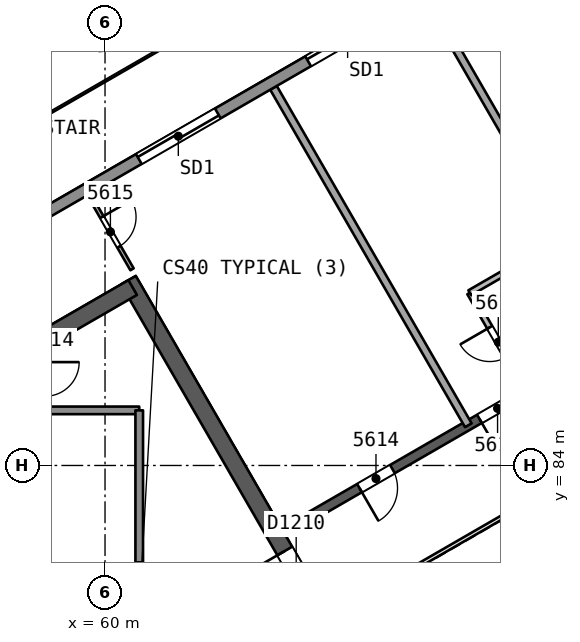
"""IFC4 building model, lengths in metres.
Left out: names, types, materials, properties, quantities, classifications, styles, units other than length and angle.
Written with IfcOpenShell. Run it as: python <this file> out.ifc"""

import sys

from ifc_helpers import new_model, si_unit, direction, frame, frame_2d, origin, place, context, subcontext, project, spatial, rectangle, extrude, element, fill, save


model = new_model("IFC4")
c1 = context("Model", 3, precision=1e-05, world=origin(), true_north=direction((0.0, 1.0)))
c2 = subcontext(c1, "Body", "Model", "MODEL_VIEW")
j1 = project(units=[si_unit("LENGTHUNIT", "METRE"), si_unit("PLANEANGLEUNIT", "RADIAN")], contexts=[c1])
p1 = place(None, origin())
s1 = spatial("IfcSite", under=j1, at=p1, CompositionType="ELEMENT")
p2 = place(p1, origin())
s2 = spatial("IfcBuilding", under=s1, at=p2, CompositionType="ELEMENT")
p3 = place(p2, frame((0.0, 0.0, 228.0)))
s3 = spatial("IfcBuildingStorey", under=s2, at=p3, CompositionType="ELEMENT", Elevation=228.0)
p4 = place(p3, frame((65.74, 80.0, 0.0), z_axis=(0.0, 0.0, 1.0), x_axis=(-0.499991857942, 0.866030104553, 0.0)))
e1 = element("IfcWall", 1, at=p4, inside=s3, PredefinedType="SHEAR", context=c2, shape_type="SweptSolid", body=[
    extrude(rectangle(XDim=10.25, YDim=0.45, at=frame_2d((5.125, 0.0))), origin(), (0.0, 0.0, 1.0), 3.7),
])
p5 = place(p4, frame((0.82, 0.0, 0.0)))
e2 = element("IfcOpeningElement", 2, at=p5, cuts=e1, PredefinedType="OPENING", context=c2, shape_type="SweptSolid", body=[
    extrude(rectangle(XDim=1.2, YDim=2.1, at=frame_2d((0.6, 1.05))), frame((0.0, 0.235, 0.0), z_axis=(0.0, -1.0, 0.0), x_axis=(1.0, 0.0, 0.0)), (0.0, 0.0, 1.0), 0.471),
])
p6 = place(p3, frame((60.728, 88.682, 0.0), z_axis=(0.0, 0.0, 1.0), x_axis=(-0.866021613849, -0.500006564303, 0.0)))
e3 = element("IfcWall", 3, at=p6, inside=s3, PredefinedType="SHEAR", context=c2, shape_type="SweptSolid", body=[
    extrude(rectangle(XDim=14.108, YDim=0.45, at=frame_2d((7.054, 0.0))), origin(), (0.0, 0.0, 1.0), 3.7),
])
p7 = place(p3, frame((78.2, 90.046, 0.0), z_axis=(0.0, 0.0, 1.0), x_axis=(-0.866026492143, -0.499998114903, 0.0)))
e4 = element("IfcWall", 4, at=p7, inside=s3, PredefinedType="SHEAR", context=c2, shape_type="SweptSolid", body=[
    extrude(rectangle(XDim=15.588, YDim=0.25, at=frame_2d((7.794, 0.0))), origin(), (0.0, 0.0, 1.0), 3.3),
])
p8 = place(p7, frame((2.15, 0.0, 0.0)))
e5 = element("IfcOpeningElement", 5, at=p8, cuts=e4, PredefinedType="OPENING", context=c2, shape_type="SweptSolid", body=[
    extrude(rectangle(XDim=1.0, YDim=2.1, at=frame_2d((0.5, 1.05))), frame((0.0, 0.135, 0.0), z_axis=(0.0, -1.0, 0.0), x_axis=(1.0, 0.0, 0.0)), (0.0, 0.0, 1.0), 0.271),
])
p9 = place(p7, frame((8.538, 0.0, 0.0)))
e6 = element("IfcOpeningElement", 6, at=p9, cuts=e4, PredefinedType="OPENING", context=c2, shape_type="SweptSolid", body=[
    extrude(rectangle(XDim=1.1, YDim=2.1, at=frame_2d((0.55, 1.05))), frame((0.0, 0.135, 0.0), z_axis=(0.0, -1.0, 0.0), x_axis=(1.0, 0.0, 0.0)), (0.0, 0.0, 1.0), 0.271),
])
p10 = place(p7, frame((12.282, 0.0, 0.0)))
e7 = element("IfcOpeningElement", 7, at=p10, cuts=e4, PredefinedType="OPENING", context=c2, shape_type="SweptSolid", body=[
    extrude(rectangle(XDim=1.0, YDim=2.1, at=frame_2d((0.5, 1.05))), frame((0.0, 0.135, 0.0), z_axis=(0.0, -1.0, 0.0), x_axis=(1.0, 0.0, 0.0)), (0.0, 0.0, 1.0), 0.271),
])
p11 = place(p3, frame((68.483, 96.276, 0.0), z_axis=(0.0, 0.0, 1.0), x_axis=(0.500011000363, -0.866019052629, 0.0)))
e8 = element("IfcWall", 8, at=p11, inside=s3, PredefinedType="PARTITIONING", context=c2, shape_type="SweptSolid", body=[
    extrude(rectangle(XDim=10.254, YDim=0.2, at=frame_2d((5.127, 0.0))), origin(), (0.0, 0.0, 1.0), 3.3),
])
p12 = place(p3, frame((71.099, 85.946, 0.0), z_axis=(0.0, 0.0, 1.0), x_axis=(-0.499990139034, 0.866031096941, 0.0)))
e9 = element("IfcWall", 9, at=p12, inside=s3, PredefinedType="PARTITIONING", context=c2, shape_type="SweptSolid", body=[
    extrude(rectangle(XDim=3.0, YDim=0.15, at=frame_2d((1.5, 0.0))), origin(), (0.0, 0.0, 1.0), 3.3),
])
p13 = place(p12, frame((1.05, 0.0, 0.0)))
e10 = element("IfcOpeningElement", 10, at=p13, cuts=e9, PredefinedType="OPENING", context=c2, shape_type="SweptSolid", body=[
    extrude(rectangle(XDim=0.9, YDim=2.1, at=frame_2d((0.45, 1.05))), frame((0.0, 0.085, 0.0), z_axis=(0.0, -1.0, 0.0), x_axis=(1.0, 0.0, 0.0)), (0.0, 0.0, 1.0), 0.171),
])
p14 = place(p3, frame((69.599, 88.544, 0.0), z_axis=(0.0, 0.0, 1.0), x_axis=(0.866032775405, 0.499987231761, 0.0)))
e11 = element("IfcWall", 11, at=p14, inside=s3, PredefinedType="PARTITIONING", context=c2, shape_type="SweptSolid", body=[
    extrude(rectangle(XDim=2.9, YDim=0.15, at=frame_2d((1.45, 0.0))), origin(), (0.0, 0.0, 1.0), 3.3),
])
p15 = place(p3, frame((64.433, 93.938, 0.0), z_axis=(0.0, 0.0, 1.0), x_axis=(0.500011000363, -0.866019052629, 0.0)))
e12 = element("IfcWall", 12, at=p15, inside=s3, PredefinedType="PARTITIONING", context=c2, shape_type="SweptSolid", body=[
    extrude(rectangle(XDim=10.254, YDim=0.2, at=frame_2d((5.127, 0.0))), origin(), (0.0, 0.0, 1.0), 3.3),
])
p16 = place(p3, frame((59.573, 91.132, 0.0), z_axis=(0.0, 0.0, 1.0), x_axis=(0.499948534732, -0.866055115232, 0.0)))
e13 = element("IfcWall", 13, at=p16, inside=s3, PredefinedType="PARTITIONING", context=c2, shape_type="SweptSolid", body=[
    extrude(rectangle(XDim=2.275, YDim=0.1, at=frame_2d((1.137, 0.0))), origin(), (0.0, 0.0, 1.0), 3.3),
])
p17 = place(p16, frame((0.687, 0.0, 0.0)))
e14 = element("IfcOpeningElement", 14, at=p17, cuts=e13, PredefinedType="OPENING", context=c2, shape_type="SweptSolid", body=[
    extrude(rectangle(XDim=0.9, YDim=2.1, at=frame_2d((0.45, 1.05))), frame((0.0, 0.061, 0.0), z_axis=(0.0, -1.0, 0.0), x_axis=(1.0, 0.0, 0.0)), (0.0, 0.0, 1.0), 0.121),
])
p18 = place(p3, frame((44.454, 82.574, 0.0), z_axis=(0.0, 0.0, 1.0), x_axis=(0.86602387423, 0.500002649256, 0.0)))
e15 = element("IfcWall", 15, at=p18, inside=s3, PredefinedType="SOLIDWALL", context=c2, shape_type="SweptSolid", body=[
    extrude(rectangle(XDim=50.333, YDim=0.3, at=frame_2d((25.167, 0.0))), origin(), (0.0, 0.0, 1.0), 3.3),
])
p19 = place(p18, frame((24.122, 0.0, 0.0)))
e16 = element("IfcOpeningElement", 16, at=p19, cuts=e15, PredefinedType="OPENING", context=c2, shape_type="SweptSolid", body=[
    extrude(rectangle(XDim=2.4, YDim=2.4, at=frame_2d((1.2, 1.2))), frame((0.0, 0.161, 0.0), z_axis=(0.0, -1.0, 0.0), x_axis=(1.0, 0.0, 0.0)), (0.0, 0.0, 1.0), 0.321),
])
p20 = place(p18, frame((29.111, 0.0, 0.0)))
e17 = element("IfcOpeningElement", 17, at=p20, cuts=e15, PredefinedType="OPENING", context=c2, shape_type="SweptSolid", body=[
    extrude(rectangle(XDim=2.4, YDim=2.4, at=frame_2d((1.2, 1.2))), frame((0.0, 0.161, 0.0), z_axis=(0.0, -1.0, 0.0), x_axis=(1.0, 0.0, 0.0)), (0.0, 0.0, 1.0), 0.321),
])
p21 = place(p18, frame((39.164, 0.0, 0.0)))
e18 = element("IfcOpeningElement", 18, at=p21, cuts=e15, PredefinedType="OPENING", context=c2, shape_type="SweptSolid", body=[
    extrude(rectangle(XDim=2.4, YDim=2.4, at=frame_2d((1.2, 1.2))), frame((0.0, 0.161, 0.0), z_axis=(0.0, -1.0, 0.0), x_axis=(1.0, 0.0, 0.0)), (0.0, 0.0, 1.0), 0.321),
])
p22 = place(p18, frame((18.978, 0.0, 0.0)))
e19 = element("IfcOpeningElement", 19, at=p22, cuts=e15, PredefinedType="OPENING", context=c2, shape_type="SweptSolid", body=[
    extrude(rectangle(XDim=2.4, YDim=2.4, at=frame_2d((1.2, 1.2))), frame((0.0, 0.161, 0.0), z_axis=(0.0, -1.0, 0.0), x_axis=(1.0, 0.0, 0.0)), (0.0, 0.0, 1.0), 0.321),
])
p23 = place(p18, frame((8.763, 0.0, 0.0)))
e20 = element("IfcOpeningElement", 20, at=p23, cuts=e15, PredefinedType="OPENING", context=c2, shape_type="SweptSolid", body=[
    extrude(rectangle(XDim=2.4, YDim=2.4, at=frame_2d((1.2, 1.2))), frame((0.0, 0.161, 0.0), z_axis=(0.0, -1.0, 0.0), x_axis=(1.0, 0.0, 0.0)), (0.0, 0.0, 1.0), 0.321),
])
p24 = place(p3, frame((60.9, 85.45, 0.0), z_axis=(0.0, 0.0, 1.0), x_axis=(-1.0, 0.0, 0.0)))
e21 = element("IfcWall", 21, at=p24, inside=s3, PredefinedType="SOLIDWALL", context=c2, shape_type="SweptSolid", body=[
    extrude(rectangle(XDim=2.48, YDim=0.2, at=frame_2d((1.24, 0.0))), origin(), (0.0, 0.0, 1.0), 3.3),
])
p25 = place(p3, frame((60.9, 85.45, 0.0), z_axis=(0.0, 0.0, 1.0), x_axis=(0.0, -1.0, 0.0)))
e22 = element("IfcWall", 22, at=p25, inside=s3, PredefinedType="SOLIDWALL", context=c2, shape_type="SweptSolid", body=[
    extrude(rectangle(XDim=10.9, YDim=0.2, at=frame_2d((5.45, 0.0))), origin(), (0.0, 0.0, 1.0), 3.3),
])
p26 = place(p25, frame((4.0, 0.0, 0.0)))
e23 = element("IfcOpeningElement", 23, at=p26, cuts=e22, PredefinedType="OPENING", context=c2, shape_type="SweptSolid", body=[
    extrude(rectangle(XDim=1.0, YDim=2.1, at=frame_2d((0.5, 1.05))), frame((0.0, 0.11, 0.0), z_axis=(0.0, -1.0, 0.0), x_axis=(1.0, 0.0, 0.0)), (0.0, 0.0, 1.0), 0.221),
])
p27 = place(p3, frame((77.738, 86.846, 0.0), z_axis=(0.0, 0.0, 1.0), x_axis=(-0.866026658274, -0.499997827154, 0.0)))
e24 = element("IfcWall", 24, at=p27, inside=s3, PredefinedType="PARTITIONING", context=c2, shape_type="SweptSolid", body=[
    extrude(rectangle(XDim=11.588, YDim=0.1, at=frame_2d((5.794, 0.0))), origin(), (0.0, 0.0, 1.0), 3.3),
])
p28 = place(p13, origin())
e25 = element("IfcDoor", 25, at=p28, inside=s3, OperationType="SINGLE_SWING_RIGHT", PredefinedType="NOTDEFINED", context=c2, shape_type="SweptSolid", body=[
    extrude(rectangle(XDim=0.9, YDim=2.1, at=frame_2d((0.45, 1.05))), frame((0.0, 0.025, 0.0), z_axis=(0.0, -1.0, 0.0), x_axis=(1.0, 0.0, 0.0)), (0.0, 0.0, 1.0), 0.05),
])
fill(e10, e25)
p29 = place(p9, origin())
e26 = element("IfcDoor", 26, at=p29, inside=s3, OperationType="SINGLE_SWING_RIGHT", PredefinedType="NOTDEFINED", context=c2, shape_type="SweptSolid", body=[
    extrude(rectangle(XDim=1.1, YDim=2.1, at=frame_2d((0.55, 1.05))), frame((0.0, 0.025, 0.0), z_axis=(0.0, -1.0, 0.0), x_axis=(1.0, 0.0, 0.0)), (0.0, 0.0, 1.0), 0.05),
])
fill(e6, e26)
p30 = place(p10, origin())
e27 = element("IfcDoor", 27, at=p30, inside=s3, OperationType="SINGLE_SWING_RIGHT", PredefinedType="NOTDEFINED", context=c2, shape_type="SweptSolid", body=[
    extrude(rectangle(XDim=1.0, YDim=2.1, at=frame_2d((0.5, 1.05))), frame((0.0, 0.025, 0.0), z_axis=(0.0, -1.0, 0.0), x_axis=(1.0, 0.0, 0.0)), (0.0, 0.0, 1.0), 0.05),
])
fill(e7, e27)
p31 = place(p17, origin())
e28 = element("IfcDoor", 28, at=p31, inside=s3, OperationType="SINGLE_SWING_LEFT", PredefinedType="NOTDEFINED", context=c2, shape_type="SweptSolid", body=[
    extrude(rectangle(XDim=0.9, YDim=2.1, at=frame_2d((0.45, 1.05))), frame((0.0, 0.025, 0.0), z_axis=(0.0, -1.0, 0.0), x_axis=(1.0, 0.0, 0.0)), (0.0, 0.0, 1.0), 0.05),
])
fill(e14, e28)
p32 = place(p19, origin())
e29 = element("IfcDoor", 29, at=p32, inside=s3, OperationType="SLIDING_TO_LEFT", PredefinedType="NOTDEFINED", context=c2, shape_type="SweptSolid", body=[
    extrude(rectangle(XDim=2.4, YDim=2.4, at=frame_2d((1.2, 1.2))), frame((0.0, 0.025, 0.0), z_axis=(0.0, -1.0, 0.0), x_axis=(1.0, 0.0, 0.0)), (0.0, 0.0, 1.0), 0.05),
])
fill(e16, e29)
p33 = place(p22, origin())
e30 = element("IfcDoor", 30, at=p33, inside=s3, OperationType="SLIDING_TO_RIGHT", PredefinedType="NOTDEFINED", context=c2, shape_type="SweptSolid", body=[
    extrude(rectangle(XDim=2.4, YDim=2.4, at=frame_2d((1.2, 1.2))), frame((0.0, 0.025, 0.0), z_axis=(0.0, -1.0, 0.0), x_axis=(1.0, 0.0, 0.0)), (0.0, 0.0, 1.0), 0.05),
])
fill(e19, e30)
p34 = place(p5, origin())
e31 = element("IfcDoor", 31, at=p34, inside=s3, OperationType="SINGLE_SWING_RIGHT", PredefinedType="NOTDEFINED", context=c2, shape_type="SweptSolid", body=[
    extrude(rectangle(XDim=1.2, YDim=2.1, at=frame_2d((0.6, 1.05))), frame((0.0, 0.025, 0.0), z_axis=(0.0, -1.0, 0.0), x_axis=(1.0, 0.0, 0.0)), (0.0, 0.0, 1.0), 0.05),
])
fill(e2, e31)
save(model, sys.argv[1])
